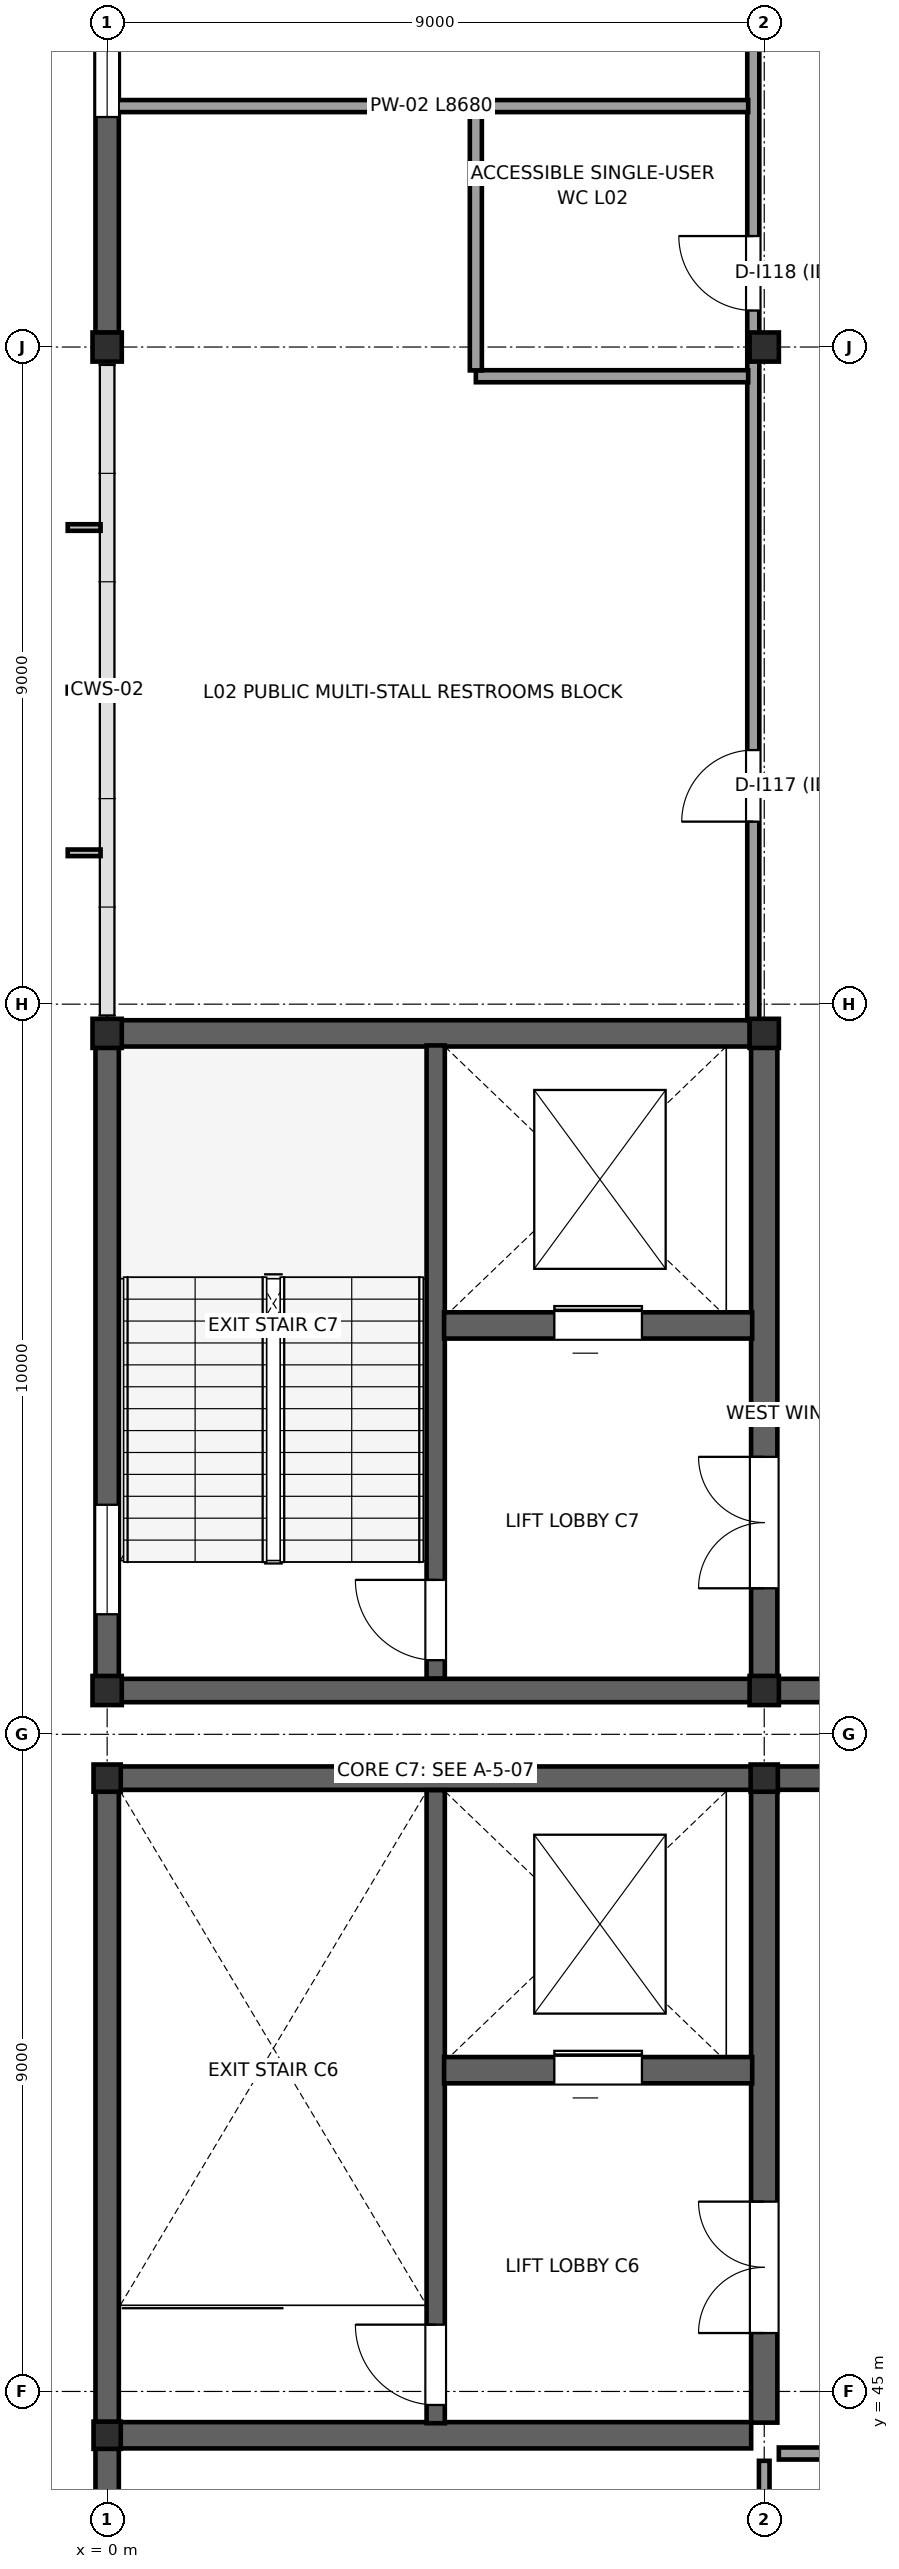
"""IFC4 building model, lengths in metres.
Left out: names, types, materials, properties, quantities, classifications, styles, units other than length and angle.
Written with IfcOpenShell. Run it as: python <this file> out.ifc"""

import sys

from ifc_helpers import new_model, si_unit, direction, frame, frame_2d, origin, origin_2d, place, context, subcontext, project, spatial, rectangle, i_section, extrude, element, fill, save


model = new_model("IFC4")
c1 = context("Model", 3, precision=1e-05, world=origin(), true_north=direction((0.0, 1.0)))
c2 = subcontext(c1, "Body", "Model", "MODEL_VIEW")
j1 = project(units=[si_unit("LENGTHUNIT", "METRE"), si_unit("PLANEANGLEUNIT", "RADIAN")], contexts=[c1])
p1 = place(None, origin())
s1 = spatial("IfcSite", under=j1, at=p1, CompositionType="ELEMENT")
p2 = place(p1, origin())
s2 = spatial("IfcBuilding", under=s1, at=p2, CompositionType="ELEMENT")
p3 = place(p2, frame((0.0, 0.0, 12.0)))
s3 = spatial("IfcBuildingStorey", under=s2, at=p3, CompositionType="ELEMENT", Elevation=12.0)
for number, where, z_axis, x_axis in (
    (1, (9.0, 53.4, 0.0), (0.0, 0.0, 1.0), (1.0, 0.0, 0.0)),
    (2, (0.0, 53.4, 0.0), (0.0, 0.0, 1.0), (1.0, 0.0, 0.0)),
    (3, (0.0, 44.4, 0.0), (0.0, 0.0, 1.0), (1.0, 0.0, 0.0)),
):
    element("IfcColumn", number, at=place(p3, frame(where, z_axis=z_axis, x_axis=x_axis)), inside=s3, PredefinedType="COLUMN", context=c2, shape_type="SweptSolid", body=[
        extrude(i_section(OverallWidth=0.373, OverallDepth=0.373, WebThickness=0.016, FlangeThickness=0.026, at=origin_2d()), origin(), (0.0, 0.0, 1.0), 5.2),
    ])
for number, where, z_axis, x_axis in (
    (4, (0.0, 54.6, 0.0), (0.0, 0.0, 1.0), (1.0, 0.0, 0.0)),
    (5, (0.0, 63.6, 0.0), (0.0, 0.0, 1.0), (1.0, 0.0, 0.0)),
    (6, (0.0, 73.0, 0.0), (0.0, 0.0, 1.0), (1.0, 0.0, 0.0)),
    (7, (9.0, 54.6, 0.0), (0.0, 0.0, 1.0), (1.0, 0.0, 0.0)),
    (8, (9.0, 63.6, 0.0), (0.0, 0.0, 1.0), (1.0, 0.0, 0.0)),
    (9, (9.0, 73.0, 0.0), (0.0, 0.0, 1.0), (1.0, 0.0, 0.0)),
):
    element("IfcColumn", number, at=place(p3, frame(where, z_axis=z_axis, x_axis=x_axis)), inside=s3, PredefinedType="COLUMN", context=c2, shape_type="SweptSolid", body=[
        extrude(i_section(OverallWidth=0.401, OverallDepth=0.399, WebThickness=0.025, FlangeThickness=0.04, at=origin_2d()), origin(), (0.0, 0.0, 1.0), 4.5),
    ])
p4 = place(p3, frame((0.0, 36.18, 0.0), z_axis=(0.0, 0.0, 1.0), x_axis=(0.0, 1.0, 0.0)))
e10 = element("IfcWall", 10, at=p4, inside=s3, PredefinedType="STANDARD", context=c2, shape_type="SweptSolid", body=[
    extrude(rectangle(XDim=8.04, YDim=0.32, at=frame_2d((4.02, 0.0))), origin(), (0.0, 0.0, 1.0), 5.05),
])
p5 = place(p4, frame((2.94, 0.0, 1.0)))
e11 = element("IfcOpeningElement", 11, at=p5, cuts=e10, PredefinedType="OPENING", context=c2, shape_type="SweptSolid", body=[
    extrude(rectangle(XDim=2.7, YDim=2.4, at=frame_2d((1.35, 1.2))), frame((0.0, 0.17, 0.0), z_axis=(0.0, -1.0, 0.0), x_axis=(1.0, 0.0, 0.0)), (0.0, 0.0, 1.0), 0.34),
])
p6 = place(p3, frame((0.0, 44.58, 0.0), z_axis=(0.0, 0.0, 1.0), x_axis=(0.0, 1.0, 0.0)))
e12 = element("IfcWall", 12, at=p6, inside=s3, PredefinedType="STANDARD", context=c2, shape_type="SweptSolid", body=[
    extrude(rectangle(XDim=8.64, YDim=0.32, at=frame_2d((4.32, 0.0))), origin(), (0.0, 0.0, 1.0), 5.05),
])
for number, where, z_axis, x_axis in (
    (13, (0.015, 53.4, 0.0), (0.0, 0.0, 1.0), (1.0, 0.0, 0.0)),
    (14, (9.015, 53.4, 0.0), (0.0, 0.0, 1.0), (1.0, 0.0, 0.0)),
):
    element("IfcWall", number, at=place(p3, frame(where, z_axis=z_axis, x_axis=x_axis)), inside=s3, PredefinedType="STANDARD", context=c2, shape_type="SweptSolid", body=[
        extrude(rectangle(XDim=8.97, YDim=0.32, at=frame_2d((4.485, 0.0))), origin(), (0.0, 0.0, 1.0), 5.05),
    ])
p7 = place(p3, frame((0.0, 54.794, 0.0), z_axis=(0.0, 0.0, 1.0), x_axis=(0.0, 1.0, 0.0)))
e15 = element("IfcWall", 15, at=p7, inside=s3, PredefinedType="STANDARD", context=c2, shape_type="SweptSolid", body=[
    extrude(rectangle(XDim=8.612, YDim=0.32, at=frame_2d((4.306, 0.0))), origin(), (0.0, 0.0, 1.0), 4.28),
])
p8 = place(p7, frame((0.85, 0.0, 1.1)))
e16 = element("IfcOpeningElement", 16, at=p8, cuts=e15, PredefinedType="OPENING", context=c2, shape_type="SweptSolid", body=[
    extrude(rectangle(XDim=1.5, YDim=1.8, at=frame_2d((0.75, 0.9))), frame((0.0, 0.17, 0.0), z_axis=(0.0, -1.0, 0.0), x_axis=(1.0, 0.0, 0.0)), (0.0, 0.0, 1.0), 0.34),
])
p9 = place(p3, frame((0.0, 73.194, 0.0), z_axis=(0.0, 0.0, 1.0), x_axis=(0.0, 1.0, 0.0)))
e17 = element("IfcWall", 17, at=p9, inside=s3, PredefinedType="STANDARD", context=c2, shape_type="SweptSolid", body=[
    extrude(rectangle(XDim=8.612, YDim=0.32, at=frame_2d((4.306, 0.0))), origin(), (0.0, 0.0, 1.0), 4.28),
])
p10 = place(p9, frame((2.956, 0.0, 1.0)))
e18 = element("IfcOpeningElement", 18, at=p10, cuts=e17, PredefinedType="OPENING", context=c2, shape_type="SweptSolid", body=[
    extrude(rectangle(XDim=2.7, YDim=2.4, at=frame_2d((1.35, 1.2))), frame((0.0, 0.17, 0.0), z_axis=(0.0, -1.0, 0.0), x_axis=(1.0, 0.0, 0.0)), (0.0, 0.0, 1.0), 0.34),
])
for number, where, z_axis, x_axis in (
    (19, (8.981, 54.6, 0.0), (0.0, 0.0, 1.0), (-1.0, 0.0, 0.0)),
    (20, (17.981, 54.6, 0.0), (0.0, 0.0, 1.0), (-1.0, 0.0, 0.0)),
):
    element("IfcWall", number, at=place(p3, frame(where, z_axis=z_axis, x_axis=x_axis)), inside=s3, PredefinedType="STANDARD", context=c2, shape_type="SweptSolid", body=[
        extrude(rectangle(XDim=8.962, YDim=0.32, at=frame_2d((4.481, 0.0))), origin(), (0.0, 0.0, 1.0), 4.28),
    ])
p11 = place(p3, frame((9.0, 44.573, 0.0), z_axis=(0.0, 0.0, 1.0), x_axis=(0.0, 1.0, 0.0)))
e21 = element("IfcWall", 21, at=p11, inside=s3, PredefinedType="SHEAR", context=c2, shape_type="SweptSolid", body=[
    extrude(rectangle(XDim=8.646, YDim=0.36, at=frame_2d((4.323, 0.0))), origin(), (0.0, 0.0, 1.0), 5.05),
])
p12 = place(p11, frame((1.227, 0.0, 0.0)))
e22 = element("IfcOpeningElement", 22, at=p12, cuts=e21, PredefinedType="OPENING", context=c2, shape_type="SweptSolid", body=[
    extrude(rectangle(XDim=1.8, YDim=2.3, at=frame_2d((0.9, 1.15))), frame((0.0, 0.19, 0.0), z_axis=(0.0, -1.0, 0.0), x_axis=(1.0, 0.0, 0.0)), (0.0, 0.0, 1.0), 0.38),
])
p13 = place(p3, frame((0.181, 44.4, 0.0), z_axis=(0.0, 0.0, 1.0), x_axis=(1.0, 0.0, 0.0)))
e23 = element("IfcWall", 23, at=p13, inside=s3, PredefinedType="SHEAR", context=c2, shape_type="SweptSolid", body=[
    extrude(rectangle(XDim=8.64, YDim=0.36, at=frame_2d((4.32, 0.0))), origin(), (0.0, 0.0, 1.0), 5.05),
])
p14 = place(p3, frame((4.5, 44.565, 0.0), z_axis=(0.0, 0.0, 1.0), x_axis=(0.0, 1.0, 0.0)))
e24 = element("IfcWall", 24, at=p14, inside=s3, PredefinedType="SHEAR", context=c2, shape_type="SweptSolid", body=[
    extrude(rectangle(XDim=8.67, YDim=0.25, at=frame_2d((4.335, 0.0))), origin(), (0.0, 0.0, 1.0), 5.05),
])
p15 = place(p14, frame((0.25, 0.0, 0.0)))
e25 = element("IfcOpeningElement", 25, at=p15, cuts=e24, PredefinedType="OPENING", context=c2, shape_type="SweptSolid", body=[
    extrude(rectangle(XDim=1.1, YDim=2.2, at=frame_2d((0.55, 1.1))), frame((0.0, 0.135, 0.0), z_axis=(0.0, -1.0, 0.0), x_axis=(1.0, 0.0, 0.0)), (0.0, 0.0, 1.0), 0.27),
])
p16 = place(p3, frame((4.615, 49.4, 0.0), z_axis=(0.0, 0.0, 1.0), x_axis=(1.0, 0.0, 0.0)))
e26 = element("IfcWall", 26, at=p16, inside=s3, PredefinedType="SHEAR", context=c2, shape_type="SweptSolid", body=[
    extrude(rectangle(XDim=4.22, YDim=0.36, at=frame_2d((2.11, 0.0))), origin(), (0.0, 0.0, 1.0), 5.05),
])
p17 = place(p16, frame((1.51, 0.0, 0.0)))
e27 = element("IfcOpeningElement", 27, at=p17, cuts=e26, PredefinedType="OPENING", context=c2, shape_type="SweptSolid", body=[
    extrude(rectangle(XDim=1.2, YDim=2.3, at=frame_2d((0.6, 1.15))), frame((0.0, 0.19, 0.0), z_axis=(0.0, -1.0, 0.0), x_axis=(1.0, 0.0, 0.0)), (0.0, 0.0, 1.0), 0.38),
])
p18 = place(p3, frame((9.0, 54.795, 0.0), z_axis=(0.0, 0.0, 1.0), x_axis=(0.0, 1.0, 0.0)))
e28 = element("IfcWall", 28, at=p18, inside=s3, PredefinedType="SHEAR", context=c2, shape_type="SweptSolid", body=[
    extrude(rectangle(XDim=8.61, YDim=0.36, at=frame_2d((4.305, 0.0))), origin(), (0.0, 0.0, 1.0), 4.28),
])
p19 = place(p18, frame((1.205, 0.0, 0.0)))
e29 = element("IfcOpeningElement", 29, at=p19, cuts=e28, PredefinedType="OPENING", context=c2, shape_type="SweptSolid", body=[
    extrude(rectangle(XDim=1.8, YDim=2.3, at=frame_2d((0.9, 1.15))), frame((0.0, 0.19, 0.0), z_axis=(0.0, -1.0, 0.0), x_axis=(1.0, 0.0, 0.0)), (0.0, 0.0, 1.0), 0.38),
])
p20 = place(p3, frame((0.196, 63.6, 0.0), z_axis=(0.0, 0.0, 1.0), x_axis=(1.0, 0.0, 0.0)))
e30 = element("IfcWall", 30, at=p20, inside=s3, PredefinedType="SHEAR", context=c2, shape_type="SweptSolid", body=[
    extrude(rectangle(XDim=8.608, YDim=0.36, at=frame_2d((4.304, 0.0))), origin(), (0.0, 0.0, 1.0), 4.28),
])
p21 = place(p3, frame((4.5, 54.765, 0.0), z_axis=(0.0, 0.0, 1.0), x_axis=(0.0, 1.0, 0.0)))
e31 = element("IfcWall", 31, at=p21, inside=s3, PredefinedType="SHEAR", context=c2, shape_type="SweptSolid", body=[
    extrude(rectangle(XDim=8.67, YDim=0.25, at=frame_2d((4.335, 0.0))), origin(), (0.0, 0.0, 1.0), 4.28),
])
p22 = place(p21, frame((0.25, 0.0, 0.0)))
e32 = element("IfcOpeningElement", 32, at=p22, cuts=e31, PredefinedType="OPENING", context=c2, shape_type="SweptSolid", body=[
    extrude(rectangle(XDim=1.1, YDim=2.2, at=frame_2d((0.55, 1.1))), frame((0.0, 0.135, 0.0), z_axis=(0.0, -1.0, 0.0), x_axis=(1.0, 0.0, 0.0)), (0.0, 0.0, 1.0), 0.27),
])
p23 = place(p3, frame((4.615, 59.6, 0.0), z_axis=(0.0, 0.0, 1.0), x_axis=(1.0, 0.0, 0.0)))
e33 = element("IfcWall", 33, at=p23, inside=s3, PredefinedType="SHEAR", context=c2, shape_type="SweptSolid", body=[
    extrude(rectangle(XDim=4.22, YDim=0.36, at=frame_2d((2.11, 0.0))), origin(), (0.0, 0.0, 1.0), 4.28),
])
p24 = place(p23, frame((1.51, 0.0, 0.0)))
e34 = element("IfcOpeningElement", 34, at=p24, cuts=e33, PredefinedType="OPENING", context=c2, shape_type="SweptSolid", body=[
    extrude(rectangle(XDim=1.2, YDim=2.3, at=frame_2d((0.6, 1.15))), frame((0.0, 0.19, 0.0), z_axis=(0.0, -1.0, 0.0), x_axis=(1.0, 0.0, 0.0)), (0.0, 0.0, 1.0), 0.38),
])
p25 = place(p3, frame((8.85, 63.78, 0.0), z_axis=(0.0, 0.0, 1.0), x_axis=(0.0, 1.0, 0.0)))
e35 = element("IfcWall", 35, at=p25, inside=s3, PredefinedType="PARTITIONING", context=c2, shape_type="SweptSolid", body=[
    extrude(rectangle(XDim=27.04, YDim=0.165, at=frame_2d((13.52, 0.0))), origin(), (0.0, 0.0, 1.0), 3.6),
])
p26 = place(p25, frame((2.72, 0.0, 0.0)))
e36 = element("IfcOpeningElement", 36, at=p26, cuts=e35, PredefinedType="OPENING", context=c2, shape_type="SweptSolid", body=[
    extrude(rectangle(XDim=0.98, YDim=2.15, at=frame_2d((0.49, 1.075))), frame((0.0, 0.093, 0.0), z_axis=(0.0, -1.0, 0.0), x_axis=(1.0, 0.0, 0.0)), (0.0, 0.0, 1.0), 0.185),
])
p27 = place(p25, frame((9.72, 0.0, 0.0)))
e37 = element("IfcOpeningElement", 37, at=p27, cuts=e35, PredefinedType="OPENING", context=c2, shape_type="SweptSolid", body=[
    extrude(rectangle(XDim=1.02, YDim=2.16, at=frame_2d((0.51, 1.08))), frame((0.0, 0.093, 0.0), z_axis=(0.0, -1.0, 0.0), x_axis=(1.0, 0.0, 0.0)), (0.0, 0.0, 1.0), 0.185),
])
p28 = place(p25, frame((14.72, 0.0, 0.0)))
e38 = element("IfcOpeningElement", 38, at=p28, cuts=e35, PredefinedType="OPENING", context=c2, shape_type="SweptSolid", body=[
    extrude(rectangle(XDim=0.95, YDim=2.12, at=frame_2d((0.475, 1.06))), frame((0.0, 0.093, 0.0), z_axis=(0.0, -1.0, 0.0), x_axis=(1.0, 0.0, 0.0)), (0.0, 0.0, 1.0), 0.185),
])
p29 = place(p3, frame((5.05, 72.6, 0.0), z_axis=(0.0, 0.0, 1.0), x_axis=(1.0, 0.0, 0.0)))
e39 = element("IfcWall", 39, at=p29, inside=s3, PredefinedType="PARTITIONING", context=c2, shape_type="SweptSolid", body=[
    extrude(rectangle(XDim=3.73, YDim=0.165, at=frame_2d((1.865, 0.0))), origin(), (0.0, 0.0, 1.0), 3.6),
])
p30 = place(p3, frame((5.05, 72.68, 0.0), z_axis=(0.0, 0.0, 1.0), x_axis=(0.0, 1.0, 0.0)))
e40 = element("IfcWall", 40, at=p30, inside=s3, PredefinedType="PARTITIONING", context=c2, shape_type="SweptSolid", body=[
    extrude(rectangle(XDim=3.54, YDim=0.165, at=frame_2d((1.77, 0.0))), origin(), (0.0, 0.0, 1.0), 3.6),
])
p31 = place(p3, frame((0.1, 76.3, 0.0), z_axis=(0.0, 0.0, 1.0), x_axis=(1.0, 0.0, 0.0)))
e41 = element("IfcWall", 41, at=p31, inside=s3, PredefinedType="PARTITIONING", context=c2, shape_type="SweptSolid", body=[
    extrude(rectangle(XDim=8.68, YDim=0.165, at=frame_2d((4.34, 0.0))), origin(), (0.0, 0.0, 1.0), 3.6),
])
p32 = place(p3, frame((9.2, 44.15, 0.0), z_axis=(0.0, 0.0, 1.0), x_axis=(1.0, 0.0, 0.0)))
e42 = element("IfcWall", 42, at=p32, inside=s3, PredefinedType="PARTITIONING", context=c2, shape_type="SweptSolid", body=[
    extrude(rectangle(XDim=8.55, YDim=0.165, at=frame_2d((4.275, 0.0))), origin(), (0.0, 0.0, 1.0), 2.8),
])
p33 = place(p32, frame((2.8, 0.0, 0.0)))
e43 = element("IfcOpeningElement", 43, at=p33, cuts=e42, PredefinedType="OPENING", context=c2, shape_type="SweptSolid", body=[
    extrude(rectangle(XDim=0.98, YDim=2.15, at=frame_2d((0.49, 1.075))), frame((0.0, 0.093, 0.0), z_axis=(0.0, -1.0, 0.0), x_axis=(1.0, 0.0, 0.0)), (0.0, 0.0, 1.0), 0.185),
])
p34 = place(p3, frame((9.0, 9.2, 0.0), z_axis=(0.0, 0.0, 1.0), x_axis=(0.0, 1.0, 0.0)))
e44 = element("IfcWall", 44, at=p34, inside=s3, PredefinedType="PARTITIONING", context=c2, shape_type="SweptSolid", body=[
    extrude(rectangle(XDim=34.85, YDim=0.145, at=frame_2d((17.425, 0.0))), origin(), (0.0, 0.0, 1.0), 2.55),
])
p35 = place(p34, frame((13.0, 0.0, 0.0)))
e45 = element("IfcOpeningElement", 45, at=p35, cuts=e44, PredefinedType="OPENING", context=c2, shape_type="SweptSolid", body=[
    extrude(rectangle(XDim=1.65, YDim=2.25, at=frame_2d((0.825, 1.125))), frame((0.0, 0.083, 0.0), z_axis=(0.0, -1.0, 0.0), x_axis=(1.0, 0.0, 0.0)), (0.0, 0.0, 1.0), 0.165),
])
p36 = place(p34, frame((25.0, 0.0, 0.0)))
e46 = element("IfcOpeningElement", 46, at=p36, cuts=e44, PredefinedType="OPENING", context=c2, shape_type="SweptSolid", body=[
    extrude(rectangle(XDim=1.65, YDim=2.25, at=frame_2d((0.825, 1.125))), frame((0.0, 0.083, 0.0), z_axis=(0.0, -1.0, 0.0), x_axis=(1.0, 0.0, 0.0)), (0.0, 0.0, 1.0), 0.165),
])
p37 = place(p8, origin())
e47 = element("IfcWindow", 47, at=p37, inside=s3, PartitioningType="SINGLE_PANEL", PredefinedType="WINDOW", context=c2, shape_type="SweptSolid", body=[
    extrude(rectangle(XDim=1.5, YDim=1.8, at=frame_2d((0.75, 0.9))), frame((0.0, 0.03, 0.0), z_axis=(0.0, -1.0, 0.0), x_axis=(1.0, 0.0, 0.0)), (0.0, 0.0, 1.0), 0.06),
])
fill(e16, e47)
p38 = place(p10, origin())
e48 = element("IfcWindow", 48, at=p38, inside=s3, PartitioningType="SINGLE_PANEL", PredefinedType="WINDOW", context=c2, shape_type="SweptSolid", body=[
    extrude(rectangle(XDim=2.7, YDim=2.4, at=frame_2d((1.35, 1.2))), frame((0.0, 0.03, 0.0), z_axis=(0.0, -1.0, 0.0), x_axis=(1.0, 0.0, 0.0)), (0.0, 0.0, 1.0), 0.06),
])
fill(e18, e48)
p39 = place(p15, origin())
e49 = element("IfcDoor", 49, at=p39, inside=s3, OperationType="SINGLE_SWING_RIGHT", PredefinedType="DOOR", context=c2, shape_type="SweptSolid", body=[
    extrude(rectangle(XDim=1.1, YDim=2.2, at=frame_2d((0.55, 1.1))), frame((0.0, 0.025, 0.0), z_axis=(0.0, -1.0, 0.0), x_axis=(1.0, 0.0, 0.0)), (0.0, 0.0, 1.0), 0.05),
])
fill(e25, e49)
p40 = place(p17, origin())
e50 = element("IfcDoor", 50, at=p40, inside=s3, OperationType="SLIDING_TO_LEFT", PredefinedType="DOOR", context=c2, shape_type="SweptSolid", body=[
    extrude(rectangle(XDim=1.2, YDim=2.3, at=frame_2d((0.6, 1.15))), frame((0.0, 0.025, 0.0), z_axis=(0.0, -1.0, 0.0), x_axis=(1.0, 0.0, 0.0)), (0.0, 0.0, 1.0), 0.05),
])
fill(e27, e50)
p41 = place(p12, origin())
e51 = element("IfcDoor", 51, at=p41, inside=s3, OperationType="DOUBLE_DOOR_SINGLE_SWING", PredefinedType="DOOR", context=c2, shape_type="SweptSolid", body=[
    extrude(rectangle(XDim=1.8, YDim=2.3, at=frame_2d((0.9, 1.15))), frame((0.0, 0.025, 0.0), z_axis=(0.0, -1.0, 0.0), x_axis=(1.0, 0.0, 0.0)), (0.0, 0.0, 1.0), 0.05),
])
fill(e22, e51)
p42 = place(p22, origin())
e52 = element("IfcDoor", 52, at=p42, inside=s3, OperationType="SINGLE_SWING_RIGHT", PredefinedType="DOOR", context=c2, shape_type="SweptSolid", body=[
    extrude(rectangle(XDim=1.1, YDim=2.2, at=frame_2d((0.55, 1.1))), frame((0.0, 0.025, 0.0), z_axis=(0.0, -1.0, 0.0), x_axis=(1.0, 0.0, 0.0)), (0.0, 0.0, 1.0), 0.05),
])
fill(e32, e52)
p43 = place(p24, origin())
e53 = element("IfcDoor", 53, at=p43, inside=s3, OperationType="SLIDING_TO_LEFT", PredefinedType="DOOR", context=c2, shape_type="SweptSolid", body=[
    extrude(rectangle(XDim=1.2, YDim=2.3, at=frame_2d((0.6, 1.15))), frame((0.0, 0.025, 0.0), z_axis=(0.0, -1.0, 0.0), x_axis=(1.0, 0.0, 0.0)), (0.0, 0.0, 1.0), 0.05),
])
fill(e34, e53)
p44 = place(p19, origin())
e54 = element("IfcDoor", 54, at=p44, inside=s3, OperationType="DOUBLE_DOOR_SINGLE_SWING", PredefinedType="DOOR", context=c2, shape_type="SweptSolid", body=[
    extrude(rectangle(XDim=1.8, YDim=2.3, at=frame_2d((0.9, 1.15))), frame((0.0, 0.025, 0.0), z_axis=(0.0, -1.0, 0.0), x_axis=(1.0, 0.0, 0.0)), (0.0, 0.0, 1.0), 0.05),
])
fill(e29, e54)
p45 = place(p26, origin())
e55 = element("IfcDoor", 55, at=p45, inside=s3, OperationType="SINGLE_SWING_LEFT", PredefinedType="DOOR", context=c2, shape_type="SweptSolid", body=[
    extrude(rectangle(XDim=0.98, YDim=2.15, at=frame_2d((0.49, 1.075))), frame((0.0, 0.025, 0.0), z_axis=(0.0, -1.0, 0.0), x_axis=(1.0, 0.0, 0.0)), (0.0, 0.0, 1.0), 0.05),
])
fill(e36, e55)
p46 = place(p27, origin())
e56 = element("IfcDoor", 56, at=p46, inside=s3, OperationType="SINGLE_SWING_RIGHT", PredefinedType="DOOR", context=c2, shape_type="SweptSolid", body=[
    extrude(rectangle(XDim=1.02, YDim=2.16, at=frame_2d((0.51, 1.08))), frame((0.0, 0.025, 0.0), z_axis=(0.0, -1.0, 0.0), x_axis=(1.0, 0.0, 0.0)), (0.0, 0.0, 1.0), 0.05),
])
fill(e37, e56)
save(model, sys.argv[1])
